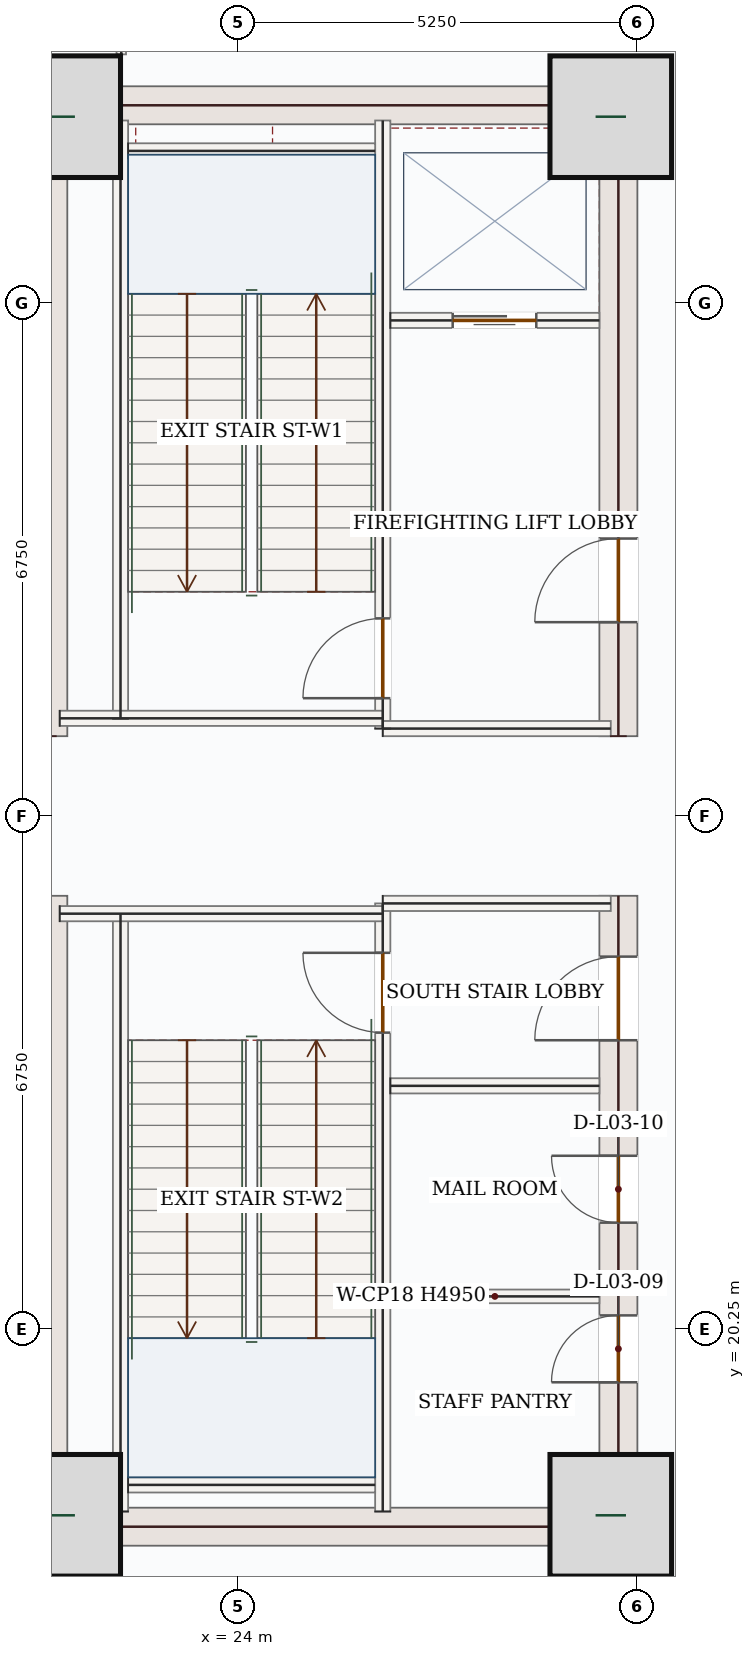
"""IFC4 building model, lengths in metres.
Left out: names, types, materials, properties, quantities, classifications, styles, units other than length and angle.
Written with IfcOpenShell. Run it as: python <this file> out.ifc"""

import sys

from ifc_helpers import new_model, si_unit, direction, frame, frame_2d, origin, origin_2d, place, context, subcontext, project, spatial, rectangle, extrude, source, transform, mapped, element, fill, save


model = new_model("IFC4")
c1 = context("Model", 3, precision=1e-05, world=origin(), true_north=direction((0.0, 1.0)))
c2 = subcontext(c1, "Body", "Model", "MODEL_VIEW")
j1 = project(units=[si_unit("LENGTHUNIT", "METRE"), si_unit("PLANEANGLEUNIT", "RADIAN")], contexts=[c1])
p1 = place(None, origin())
s1 = spatial("IfcSite", under=j1, at=p1, CompositionType="ELEMENT")
p2 = place(p1, origin())
s2 = spatial("IfcBuilding", under=s1, at=p2, CompositionType="ELEMENT")
p3 = place(p2, frame((0.0, 0.0, 18.0)))
s3 = spatial("IfcBuildingStorey", under=s2, at=p3, CompositionType="ELEMENT", Elevation=18.0)
m1 = source(origin(), c2, "Body", "SweptSolid", [
    extrude(rectangle(XDim=8.55, YDim=0.5, at=frame_2d((4.275, 0.0))), origin(), (0.0, 0.0, 1.0), 4.95),
])
for number, where, z_axis, x_axis in (
    (1, (21.5, 17.4, 0.0), (0.0, 0.0, 1.0), (0.0, 1.0, 0.0)),
    (2, (21.5, 28.05, 0.0), (0.0, 0.0, 1.0), (0.0, 1.0, 0.0)),
):
    element("IfcWall", number, at=place(p3, frame(where, z_axis=z_axis, x_axis=x_axis)), inside=s3, PredefinedType="SHEAR", context=c2, shape_type="MappedRepresentation", body=[
        mapped(m1, transform((0.0, 0.0, 0.0), x_axis=(1.0, 0.0, 0.0), y_axis=(0.0, 1.0, 0.0), z_axis=(0.0, 0.0, 1.0), scale=1.0)),
    ])
p4 = place(p3, frame((29.0, 17.4, 0.0), z_axis=(0.0, 0.0, 1.0), x_axis=(0.0, 1.0, 0.0)))
e3 = element("IfcWall", 3, at=p4, inside=s3, PredefinedType="SHEAR", context=c2, shape_type="SweptSolid", body=[
    extrude(rectangle(XDim=8.55, YDim=0.5, at=frame_2d((4.275, 0.0))), origin(), (0.0, 0.0, 1.0), 4.95),
])
p5 = place(p4, frame((6.65, 0.0, 0.0)))
e4 = element("IfcOpeningElement", 4, at=p5, cuts=e3, PredefinedType="OPENING", context=c2, shape_type="SweptSolid", body=[
    extrude(rectangle(XDim=1.1, YDim=2.2, at=frame_2d((0.55, 1.1))), frame((0.0, 0.26, 0.0), z_axis=(0.0, -1.0, 0.0), x_axis=(1.0, 0.0, 0.0)), (0.0, 0.0, 1.0), 0.52),
])
p6 = place(p4, frame((2.15, 0.0, 0.0)))
e5 = element("IfcOpeningElement", 5, at=p6, cuts=e3, PredefinedType="OPENING", context=c2, shape_type="SweptSolid", body=[
    extrude(rectangle(XDim=0.88, YDim=2.1, at=frame_2d((0.44, 1.05))), frame((0.0, 0.26, 0.0), z_axis=(0.0, -1.0, 0.0), x_axis=(1.0, 0.0, 0.0)), (0.0, 0.0, 1.0), 0.52),
])
p7 = place(p4, frame((4.25, 0.0, 0.0)))
e6 = element("IfcOpeningElement", 6, at=p7, cuts=e3, PredefinedType="OPENING", context=c2, shape_type="SweptSolid", body=[
    extrude(rectangle(XDim=0.88, YDim=2.1, at=frame_2d((0.44, 1.05))), frame((0.0, 0.26, 0.0), z_axis=(0.0, -1.0, 0.0), x_axis=(1.0, 0.0, 0.0)), (0.0, 0.0, 1.0), 0.52),
])
p8 = place(p3, frame((29.0, 28.05, 0.0), z_axis=(0.0, 0.0, 1.0), x_axis=(0.0, 1.0, 0.0)))
e7 = element("IfcWall", 7, at=p8, inside=s3, PredefinedType="SHEAR", context=c2, shape_type="SweptSolid", body=[
    extrude(rectangle(XDim=8.55, YDim=0.5, at=frame_2d((4.275, 0.0))), origin(), (0.0, 0.0, 1.0), 4.95),
])
p9 = place(p8, frame((1.5, 0.0, 0.0)))
e8 = element("IfcOpeningElement", 8, at=p9, cuts=e7, PredefinedType="OPENING", context=c2, shape_type="SweptSolid", body=[
    extrude(rectangle(XDim=1.1, YDim=2.2, at=frame_2d((0.55, 1.1))), frame((0.0, 0.26, 0.0), z_axis=(0.0, -1.0, 0.0), x_axis=(1.0, 0.0, 0.0)), (0.0, 0.0, 1.0), 0.52),
])
m2 = source(origin(), c2, "Body", "SweptSolid", [
    extrude(rectangle(XDim=7.0, YDim=0.5, at=frame_2d((3.5, 0.0))), origin(), (0.0, 0.0, 1.0), 4.95),
])
for number, where, z_axis, x_axis in (
    (9, (21.75, 17.65, 0.0), (0.0, 0.0, 1.0), (1.0, 0.0, 0.0)),
    (10, (21.75, 36.35, 0.0), (0.0, 0.0, 1.0), (1.0, 0.0, 0.0)),
):
    element("IfcWall", number, at=place(p3, frame(where, z_axis=z_axis, x_axis=x_axis)), inside=s3, PredefinedType="SHEAR", context=c2, shape_type="MappedRepresentation", body=[
        mapped(m2, transform((0.0, 0.0, 0.0), x_axis=(1.0, 0.0, 0.0), y_axis=(0.0, 1.0, 0.0), z_axis=(0.0, 0.0, 1.0), scale=1.0)),
    ])
m3 = source(origin(), c2, "Body", "SweptSolid", [
    extrude(rectangle(XDim=1.6, YDim=1.6, at=origin_2d()), origin(), (0.0, 0.0, 1.0), 5.4),
])
for number, where, z_axis, x_axis in (
    (11, (21.65, 17.8, 0.0), (0.0, 0.0, 1.0), (1.0, 0.0, 0.0)),
    (12, (28.9, 17.8, 0.0), (0.0, 0.0, 1.0), (1.0, 0.0, 0.0)),
    (13, (21.65, 36.2, 0.0), (0.0, 0.0, 1.0), (1.0, 0.0, 0.0)),
    (14, (28.9, 36.2, 0.0), (0.0, 0.0, 1.0), (1.0, 0.0, 0.0)),
):
    element("IfcColumn", number, at=place(p3, frame(where, z_axis=z_axis, x_axis=x_axis)), inside=s3, PredefinedType="COLUMN", context=c2, shape_type="MappedRepresentation", body=[
        mapped(m3, transform((0.0, 0.0, 0.0), x_axis=(1.0, 0.0, 0.0), y_axis=(0.0, 1.0, 0.0), z_axis=(0.0, 0.0, 1.0), scale=1.0)),
    ])
m4 = source(origin(), c2, "Body", "SweptSolid", [
    extrude(rectangle(XDim=7.87, YDim=0.2, at=frame_2d((3.935, 0.0))), origin(), (0.0, 0.0, 1.0), 4.95),
])
for number, where, z_axis, x_axis in (
    (15, (22.45, 17.85, 0.0), (0.0, 0.0, 1.0), (0.0, 1.0, 0.0)),
    (16, (22.45, 28.28, 0.0), (0.0, 0.0, 1.0), (0.0, 1.0, 0.0)),
):
    element("IfcWall", number, at=place(p3, frame(where, z_axis=z_axis, x_axis=x_axis)), inside=s3, PredefinedType="SOLIDWALL", context=c2, shape_type="MappedRepresentation", body=[
        mapped(m4, transform((0.0, 0.0, 0.0), x_axis=(1.0, 0.0, 0.0), y_axis=(0.0, 1.0, 0.0), z_axis=(0.0, 0.0, 1.0), scale=1.0)),
    ])
p10 = place(p3, frame((25.9, 17.85, 0.0), z_axis=(0.0, 0.0, 1.0), x_axis=(0.0, 1.0, 0.0)))
e17 = element("IfcWall", 17, at=p10, inside=s3, PredefinedType="SOLIDWALL", context=c2, shape_type="SweptSolid", body=[
    extrude(rectangle(XDim=8.0, YDim=0.2, at=frame_2d((4.0, 0.0))), origin(), (0.0, 0.0, 1.0), 4.95),
])
p11 = place(p10, frame((6.3, 0.0, 0.0)))
e18 = element("IfcOpeningElement", 18, at=p11, cuts=e17, PredefinedType="OPENING", context=c2, shape_type="SweptSolid", body=[
    extrude(rectangle(XDim=1.05, YDim=2.15, at=frame_2d((0.525, 1.075))), frame((0.0, 0.11, 0.0), z_axis=(0.0, -1.0, 0.0), x_axis=(1.0, 0.0, 0.0)), (0.0, 0.0, 1.0), 0.22),
])
p12 = place(p3, frame((25.9, 28.15, 0.0), z_axis=(0.0, 0.0, 1.0), x_axis=(0.0, 1.0, 0.0)))
e19 = element("IfcWall", 19, at=p12, inside=s3, PredefinedType="SOLIDWALL", context=c2, shape_type="SweptSolid", body=[
    extrude(rectangle(XDim=8.0, YDim=0.2, at=frame_2d((4.0, 0.0))), origin(), (0.0, 0.0, 1.0), 4.95),
])
p13 = place(p12, frame((0.4, 0.0, 0.0)))
e20 = element("IfcOpeningElement", 20, at=p13, cuts=e19, PredefinedType="OPENING", context=c2, shape_type="SweptSolid", body=[
    extrude(rectangle(XDim=1.05, YDim=2.15, at=frame_2d((0.525, 1.075))), frame((0.0, 0.11, 0.0), z_axis=(0.0, -1.0, 0.0), x_axis=(1.0, 0.0, 0.0)), (0.0, 0.0, 1.0), 0.22),
])
m5 = source(origin(), c2, "Body", "SweptSolid", [
    extrude(rectangle(XDim=4.25, YDim=0.2, at=frame_2d((2.125, 0.0))), origin(), (0.0, 0.0, 1.0), 4.95),
])
p14 = place(p3, frame((21.65, 25.715, 0.0), z_axis=(0.0, 0.0, 1.0), x_axis=(1.0, 0.0, 0.0)))
e21 = element("IfcWall", 21, at=p14, inside=s3, PredefinedType="SOLIDWALL", context=c2, shape_type="MappedRepresentation", body=[
    mapped(m5, transform((0.0, 0.0, 0.0), x_axis=(1.0, 0.0, 0.0), y_axis=(0.0, 1.0, 0.0), z_axis=(0.0, 0.0, 1.0), scale=1.0)),
])
m6 = source(origin(), c2, "Body", "SweptSolid", [
    extrude(rectangle(XDim=3.0, YDim=0.2, at=frame_2d((1.5, 0.0))), origin(), (0.0, 0.0, 1.0), 4.95),
])
p15 = place(p3, frame((25.9, 25.85, 0.0), z_axis=(0.0, 0.0, 1.0), x_axis=(1.0, 0.0, 0.0)))
e22 = element("IfcWall", 22, at=p15, inside=s3, PredefinedType="SOLIDWALL", context=c2, shape_type="MappedRepresentation", body=[
    mapped(m6, transform((0.0, 0.0, 0.0), x_axis=(1.0, 0.0, 0.0), y_axis=(0.0, 1.0, 0.0), z_axis=(0.0, 0.0, 1.0), scale=1.0)),
])
p16 = place(p3, frame((21.65, 28.285, 0.0), z_axis=(0.0, 0.0, 1.0), x_axis=(1.0, 0.0, 0.0)))
e23 = element("IfcWall", 23, at=p16, inside=s3, PredefinedType="SOLIDWALL", context=c2, shape_type="MappedRepresentation", body=[
    mapped(m5, transform((0.0, 0.0, 0.0), x_axis=(1.0, 0.0, 0.0), y_axis=(0.0, 1.0, 0.0), z_axis=(0.0, 0.0, 1.0), scale=1.0)),
])
p17 = place(p3, frame((25.9, 28.15, 0.0), z_axis=(0.0, 0.0, 1.0), x_axis=(1.0, 0.0, 0.0)))
e24 = element("IfcWall", 24, at=p17, inside=s3, PredefinedType="SOLIDWALL", context=c2, shape_type="MappedRepresentation", body=[
    mapped(m6, transform((0.0, 0.0, 0.0), x_axis=(1.0, 0.0, 0.0), y_axis=(0.0, 1.0, 0.0), z_axis=(0.0, 0.0, 1.0), scale=1.0)),
])
m7 = source(origin(), c2, "Body", "SweptSolid", [
    extrude(rectangle(XDim=3.25, YDim=0.2, at=frame_2d((1.625, 0.0))), origin(), (0.0, 0.0, 1.0), 4.95),
])
for number, where, z_axis, x_axis in (
    (25, (22.55, 35.75, 0.0), (0.0, 0.0, 1.0), (1.0, 0.0, 0.0)),
    (26, (22.55, 18.2, 0.0), (0.0, 0.0, 1.0), (1.0, 0.0, 0.0)),
):
    element("IfcWall", number, at=place(p3, frame(where, z_axis=z_axis, x_axis=x_axis)), inside=s3, PredefinedType="SOLIDWALL", context=c2, shape_type="MappedRepresentation", body=[
        mapped(m7, transform((0.0, 0.0, 0.0), x_axis=(1.0, 0.0, 0.0), y_axis=(0.0, 1.0, 0.0), z_axis=(0.0, 0.0, 1.0), scale=1.0)),
    ])
p18 = place(p3, frame((26.0, 33.52, 0.0), z_axis=(0.0, 0.0, 1.0), x_axis=(1.0, 0.0, 0.0)))
e27 = element("IfcWall", 27, at=p18, inside=s3, PredefinedType="SOLIDWALL", context=c2, shape_type="SweptSolid", body=[
    extrude(rectangle(XDim=2.75, YDim=0.2, at=frame_2d((1.375, 0.0))), origin(), (0.0, 0.0, 1.0), 4.95),
])
p19 = place(p18, frame((0.82, 0.0, 0.0)))
e28 = element("IfcOpeningElement", 28, at=p19, cuts=e27, PredefinedType="OPENING", context=c2, shape_type="SweptSolid", body=[
    extrude(rectangle(XDim=1.1, YDim=2.15, at=frame_2d((0.55, 1.075))), frame((0.0, 0.11, 0.0), z_axis=(0.0, -1.0, 0.0), x_axis=(1.0, 0.0, 0.0)), (0.0, 0.0, 1.0), 0.22),
])
m8 = source(origin(), c2, "Body", "SweptSolid", [
    extrude(rectangle(XDim=2.75, YDim=0.2, at=frame_2d((1.375, 0.0))), origin(), (0.0, 0.0, 1.0), 4.95),
])
p20 = place(p3, frame((26.0, 23.45, 0.0), z_axis=(0.0, 0.0, 1.0), x_axis=(1.0, 0.0, 0.0)))
e29 = element("IfcWall", 29, at=p20, inside=s3, PredefinedType="SOLIDWALL", context=c2, shape_type="MappedRepresentation", body=[
    mapped(m8, transform((0.0, 0.0, 0.0), x_axis=(1.0, 0.0, 0.0), y_axis=(0.0, 1.0, 0.0), z_axis=(0.0, 0.0, 1.0), scale=1.0)),
])
m9 = source(origin(), c2, "Body", "SweptSolid", [
    extrude(rectangle(XDim=2.75, YDim=0.18, at=frame_2d((1.375, 0.0))), origin(), (0.0, 0.0, 1.0), 4.95),
])
p21 = place(p3, frame((26.0, 20.68, 0.0), z_axis=(0.0, 0.0, 1.0), x_axis=(1.0, 0.0, 0.0)))
e30 = element("IfcWall", 30, at=p21, inside=s3, PredefinedType="PARTITIONING", context=c2, shape_type="MappedRepresentation", body=[
    mapped(m9, transform((0.0, 0.0, 0.0), x_axis=(1.0, 0.0, 0.0), y_axis=(0.0, 1.0, 0.0), z_axis=(0.0, 0.0, 1.0), scale=1.0)),
])
m10 = source(origin(), c2, "Body", "SweptSolid", [
    extrude(rectangle(XDim=1.826, YDim=0.125, at=frame_2d((0.913, 0.0))), origin(), (0.0, 0.0, 1.0), 4.95),
])
p22 = place(p3, frame((22.46, 38.846, 0.0), z_axis=(0.0, 0.0, 1.0), x_axis=(0.0, -1.0, 0.0)))
e31 = element("IfcWall", 31, at=p22, inside=s3, PredefinedType="PARTITIONING", context=c2, shape_type="MappedRepresentation", body=[
    mapped(m10, transform((0.0, 0.0, 0.0), x_axis=(1.0, 0.0, 0.0), y_axis=(0.0, 1.0, 0.0), z_axis=(0.0, 0.0, 1.0), scale=1.0)),
])
m11 = source(origin(), c2, "Body", "SweptSolid", [
    extrude(rectangle(XDim=1.05, YDim=2.15, at=frame_2d((0.525, 1.075))), frame((0.0, 0.025, 0.0), z_axis=(0.0, -1.0, 0.0), x_axis=(1.0, 0.0, 0.0)), (0.0, 0.0, 1.0), 0.05),
])
p23 = place(p13, origin())
e32 = element("IfcDoor", 32, at=p23, inside=s3, OperationType="SINGLE_SWING_LEFT", PredefinedType="DOOR", context=c2, shape_type="MappedRepresentation", body=[
    mapped(m11, transform((0.0, 0.0, 0.0), x_axis=(1.0, 0.0, 0.0), y_axis=(0.0, 1.0, 0.0), z_axis=(0.0, 0.0, 1.0), scale=1.0)),
])
fill(e20, e32)
p24 = place(p11, origin())
e33 = element("IfcDoor", 33, at=p24, inside=s3, OperationType="SINGLE_SWING_RIGHT", PredefinedType="DOOR", context=c2, shape_type="MappedRepresentation", body=[
    mapped(m11, transform((0.0, 0.0, 0.0), x_axis=(1.0, 0.0, 0.0), y_axis=(0.0, 1.0, 0.0), z_axis=(0.0, 0.0, 1.0), scale=1.0)),
])
fill(e18, e33)
m12 = source(origin(), c2, "Body", "SweptSolid", [
    extrude(rectangle(XDim=1.1, YDim=2.15, at=frame_2d((0.55, 1.075))), frame((0.0, 0.025, 0.0), z_axis=(0.0, -1.0, 0.0), x_axis=(1.0, 0.0, 0.0)), (0.0, 0.0, 1.0), 0.05),
])
p25 = place(p19, origin())
e34 = element("IfcDoor", 34, at=p25, inside=s3, OperationType="DOUBLE_DOOR_SLIDING", PredefinedType="DOOR", context=c2, shape_type="MappedRepresentation", body=[
    mapped(m12, transform((0.0, 0.0, 0.0), x_axis=(1.0, 0.0, 0.0), y_axis=(0.0, 1.0, 0.0), z_axis=(0.0, 0.0, 1.0), scale=1.0)),
])
fill(e28, e34)
m13 = source(origin(), c2, "Body", "SweptSolid", [
    extrude(rectangle(XDim=1.1, YDim=2.2, at=frame_2d((0.55, 1.1))), frame((0.0, 0.025, 0.0), z_axis=(0.0, -1.0, 0.0), x_axis=(1.0, 0.0, 0.0)), (0.0, 0.0, 1.0), 0.05),
])
p26 = place(p9, origin())
e35 = element("IfcDoor", 35, at=p26, inside=s3, OperationType="SINGLE_SWING_LEFT", PredefinedType="DOOR", context=c2, shape_type="MappedRepresentation", body=[
    mapped(m13, transform((0.0, 0.0, 0.0), x_axis=(1.0, 0.0, 0.0), y_axis=(0.0, 1.0, 0.0), z_axis=(0.0, 0.0, 1.0), scale=1.0)),
])
fill(e8, e35)
p27 = place(p5, origin())
e36 = element("IfcDoor", 36, at=p27, inside=s3, OperationType="SINGLE_SWING_LEFT", PredefinedType="DOOR", context=c2, shape_type="MappedRepresentation", body=[
    mapped(m13, transform((0.0, 0.0, 0.0), x_axis=(1.0, 0.0, 0.0), y_axis=(0.0, 1.0, 0.0), z_axis=(0.0, 0.0, 1.0), scale=1.0)),
])
fill(e4, e36)
m14 = source(origin(), c2, "Body", "SweptSolid", [
    extrude(rectangle(XDim=0.88, YDim=2.1, at=frame_2d((0.44, 1.05))), frame((0.0, 0.025, 0.0), z_axis=(0.0, -1.0, 0.0), x_axis=(1.0, 0.0, 0.0)), (0.0, 0.0, 1.0), 0.05),
])
p28 = place(p6, origin())
e37 = element("IfcDoor", 37, at=p28, inside=s3, OperationType="SINGLE_SWING_LEFT", PredefinedType="DOOR", context=c2, shape_type="MappedRepresentation", body=[
    mapped(m14, transform((0.0, 0.0, 0.0), x_axis=(1.0, 0.0, 0.0), y_axis=(0.0, 1.0, 0.0), z_axis=(0.0, 0.0, 1.0), scale=1.0)),
])
fill(e5, e37)
p29 = place(p7, origin())
e38 = element("IfcDoor", 38, at=p29, inside=s3, OperationType="SINGLE_SWING_RIGHT", PredefinedType="DOOR", context=c2, shape_type="MappedRepresentation", body=[
    mapped(m14, transform((0.0, 0.0, 0.0), x_axis=(1.0, 0.0, 0.0), y_axis=(0.0, 1.0, 0.0), z_axis=(0.0, 0.0, 1.0), scale=1.0)),
])
fill(e6, e38)
save(model, sys.argv[1])
